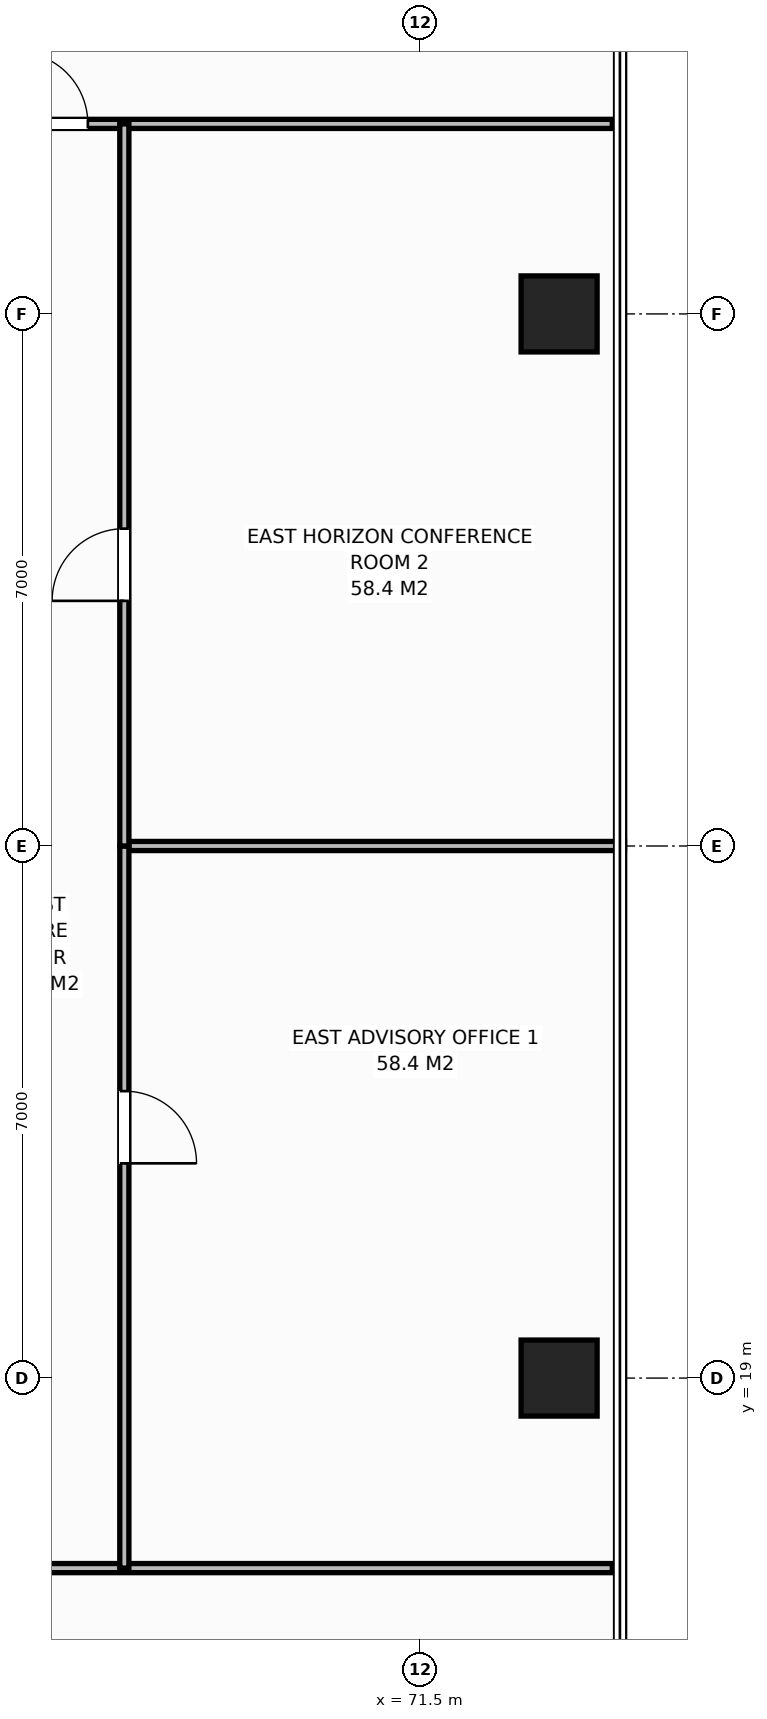
"""IFC4 building model, lengths in metres.
Left out: names, types, materials, properties, quantities, classifications, styles, units other than length and angle.
Written with IfcOpenShell. Run it as: python <this file> out.ifc"""

import sys

from ifc_helpers import new_model, si_unit, direction, frame, frame_2d, origin, origin_2d, place, context, subcontext, project, spatial, rectangle, extrude, element, fill, save


model = new_model("IFC4")
c1 = context("Model", 3, precision=1e-05, world=origin(), true_north=direction((0.0, 1.0)))
c2 = subcontext(c1, "Body", "Model", "MODEL_VIEW")
j1 = project(units=[si_unit("LENGTHUNIT", "METRE"), si_unit("PLANEANGLEUNIT", "RADIAN")], contexts=[c1])
p1 = place(None, origin())
s1 = spatial("IfcSite", under=j1, at=p1, CompositionType="ELEMENT")
p2 = place(p1, origin())
s2 = spatial("IfcBuilding", under=s1, at=p2, CompositionType="ELEMENT")
p3 = place(p2, frame((0.0, 0.0, 163.2)))
s3 = spatial("IfcBuildingStorey", under=s2, at=p3, CompositionType="ELEMENT", Elevation=163.2)
for number, where, z_axis, x_axis in (
    (1, (73.32, 19.0, 0.0), (0.0, 0.0, 1.0), (1.0, 0.0, 0.0)),
    (2, (73.32, 33.0, 0.0), (0.0, 0.0, 1.0), (1.0, 0.0, 0.0)),
):
    element("IfcColumn", number, at=place(p3, frame(where, z_axis=z_axis, x_axis=x_axis)), inside=s3, PredefinedType="COLUMN", context=c2, shape_type="SweptSolid", body=[
        extrude(rectangle(XDim=1.0, YDim=1.0, at=origin_2d()), origin(), (0.0, 0.0, 1.0), 3.8),
    ])
p4 = place(p3, frame((64.86, 35.5, 0.0), z_axis=(0.0, 0.0, 1.0), x_axis=(1.0, 0.0, 0.0)))
e3 = element("IfcWall", 3, at=p4, inside=s3, PredefinedType="PARTITIONING", context=c2, shape_type="SweptSolid", body=[
    extrude(rectangle(XDim=9.16, YDim=0.12, at=frame_2d((4.58, 0.0))), origin(), (0.0, 0.0, 1.0), 3.572),
])
p5 = place(p4, frame((1.31, 0.0, 0.0)))
e4 = element("IfcOpeningElement", 4, at=p5, cuts=e3, PredefinedType="OPENING", context=c2, shape_type="SweptSolid", body=[
    extrude(rectangle(XDim=0.95, YDim=2.15, at=frame_2d((0.475, 1.075))), frame((0.0, 0.07, 0.0), z_axis=(0.0, -1.0, 0.0), x_axis=(1.0, 0.0, 0.0)), (0.0, 0.0, 1.0), 0.14),
])
p6 = place(p3, frame((61.704, 16.5, 0.0), z_axis=(0.0, 0.0, 1.0), x_axis=(1.0, 0.0, 0.0)))
e5 = element("IfcWall", 5, at=p6, inside=s3, PredefinedType="PARTITIONING", context=c2, shape_type="SweptSolid", body=[
    extrude(rectangle(XDim=12.316, YDim=0.12, at=frame_2d((6.158, 0.0))), origin(), (0.0, 0.0, 1.0), 3.572),
])
p7 = place(p6, frame((0.48, 0.0, 0.0)))
e6 = element("IfcOpeningElement", 6, at=p7, cuts=e5, PredefinedType="OPENING", context=c2, shape_type="SweptSolid", body=[
    extrude(rectangle(XDim=0.95, YDim=2.15, at=frame_2d((0.475, 1.075))), frame((0.0, 0.07, 0.0), z_axis=(0.0, -1.0, 0.0), x_axis=(1.0, 0.0, 0.0)), (0.0, 0.0, 1.0), 0.14),
])
p8 = place(p3, frame((67.6, 26.0, 0.0), z_axis=(0.0, 0.0, 1.0), x_axis=(1.0, 0.0, 0.0)))
e7 = element("IfcWall", 7, at=p8, inside=s3, PredefinedType="PARTITIONING", context=c2, shape_type="SweptSolid", body=[
    extrude(rectangle(XDim=6.58, YDim=0.12, at=frame_2d((3.29, 0.0))), origin(), (0.0, 0.0, 1.0), 3.572),
])
p9 = place(p3, frame((67.6, 16.5, 0.0), z_axis=(0.0, 0.0, 1.0), x_axis=(0.0, 1.0, 0.0)))
e8 = element("IfcWall", 8, at=p9, inside=s3, PredefinedType="PARTITIONING", context=c2, shape_type="SweptSolid", body=[
    extrude(rectangle(XDim=9.5, YDim=0.12, at=frame_2d((4.75, 0.0))), origin(), (0.0, 0.0, 1.0), 3.572),
])
p10 = place(p9, frame((5.325, 0.0, 0.0)))
e9 = element("IfcOpeningElement", 9, at=p10, cuts=e8, PredefinedType="OPENING", context=c2, shape_type="SweptSolid", body=[
    extrude(rectangle(XDim=0.95, YDim=2.15, at=frame_2d((0.475, 1.075))), frame((0.0, 0.07, 0.0), z_axis=(0.0, -1.0, 0.0), x_axis=(1.0, 0.0, 0.0)), (0.0, 0.0, 1.0), 0.14),
])
p11 = place(p3, frame((67.6, 26.0, 0.0), z_axis=(0.0, 0.0, 1.0), x_axis=(0.0, 1.0, 0.0)))
e10 = element("IfcWall", 10, at=p11, inside=s3, PredefinedType="PARTITIONING", context=c2, shape_type="SweptSolid", body=[
    extrude(rectangle(XDim=9.5, YDim=0.12, at=frame_2d((4.75, 0.0))), origin(), (0.0, 0.0, 1.0), 3.572),
])
p12 = place(p11, frame((3.225, 0.0, 0.0)))
e11 = element("IfcOpeningElement", 11, at=p12, cuts=e10, PredefinedType="OPENING", context=c2, shape_type="SweptSolid", body=[
    extrude(rectangle(XDim=0.95, YDim=2.15, at=frame_2d((0.475, 1.075))), frame((0.0, 0.07, 0.0), z_axis=(0.0, -1.0, 0.0), x_axis=(1.0, 0.0, 0.0)), (0.0, 0.0, 1.0), 0.14),
])
p13 = place(p5, origin())
e12 = element("IfcDoor", 12, at=p13, inside=s3, OperationType="SINGLE_SWING_LEFT", PredefinedType="DOOR", context=c2, shape_type="SweptSolid", body=[
    extrude(rectangle(XDim=0.95, YDim=2.15, at=frame_2d((0.475, 1.075))), frame((0.0, 0.025, 0.0), z_axis=(0.0, -1.0, 0.0), x_axis=(1.0, 0.0, 0.0)), (0.0, 0.0, 1.0), 0.05),
])
fill(e4, e12)
p14 = place(p10, origin())
e13 = element("IfcDoor", 13, at=p14, inside=s3, OperationType="SINGLE_SWING_RIGHT", PredefinedType="DOOR", context=c2, shape_type="SweptSolid", body=[
    extrude(rectangle(XDim=0.95, YDim=2.15, at=frame_2d((0.475, 1.075))), frame((0.0, 0.025, 0.0), z_axis=(0.0, -1.0, 0.0), x_axis=(1.0, 0.0, 0.0)), (0.0, 0.0, 1.0), 0.05),
])
fill(e9, e13)
p15 = place(p12, origin())
e14 = element("IfcDoor", 14, at=p15, inside=s3, OperationType="SINGLE_SWING_LEFT", PredefinedType="DOOR", context=c2, shape_type="SweptSolid", body=[
    extrude(rectangle(XDim=0.95, YDim=2.15, at=frame_2d((0.475, 1.075))), frame((0.0, 0.025, 0.0), z_axis=(0.0, -1.0, 0.0), x_axis=(1.0, 0.0, 0.0)), (0.0, 0.0, 1.0), 0.05),
])
fill(e11, e14)
save(model, sys.argv[1])
